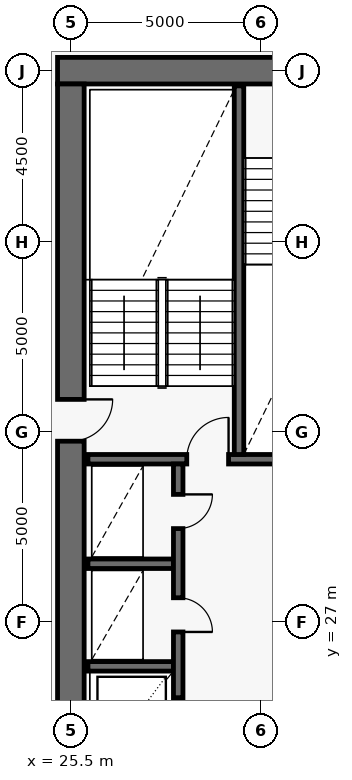
"""IFC4 building model, lengths in metres.
Left out: names, types, materials, properties, quantities, classifications, styles, units other than length and angle.
Written with IfcOpenShell. Run it as: python <this file> out.ifc"""

import sys

from ifc_helpers import new_model, si_unit, direction, frame, frame_2d, origin, place, context, subcontext, project, spatial, rectangle, extrude, element, fill, save


model = new_model("IFC4")
c1 = context("Model", 3, precision=1e-05, world=origin(), true_north=direction((0.0, 1.0)))
c2 = subcontext(c1, "Body", "Model", "MODEL_VIEW")
j1 = project(units=[si_unit("LENGTHUNIT", "METRE"), si_unit("PLANEANGLEUNIT", "RADIAN")], contexts=[c1])
p1 = place(None, origin())
s1 = spatial("IfcSite", under=j1, at=p1, CompositionType="ELEMENT")
p2 = place(p1, origin())
s2 = spatial("IfcBuilding", under=s1, at=p2, CompositionType="ELEMENT")
p3 = place(p2, frame((0.0, 0.0, 150.4)))
s3 = spatial("IfcBuildingStorey", under=s2, at=p3, CompositionType="ELEMENT", Elevation=150.4)
p4 = place(p3, frame((36.75, 41.5, 0.0), z_axis=(0.0, 0.0, 1.0), x_axis=(-1.0, 0.0, 0.0)))
e1 = element("IfcWall", 1, at=p4, inside=s3, PredefinedType="SHEAR", context=c2, shape_type="SweptSolid", body=[
    extrude(rectangle(XDim=11.6, YDim=0.7, at=frame_2d((5.8, 0.0))), origin(), (0.0, 0.0, 1.0), 3.8),
])
p5 = place(p4, frame((4.25, 0.0, 0.0)))
e2 = element("IfcOpeningElement", 2, at=p5, cuts=e1, PredefinedType="OPENING", context=c2, shape_type="SweptSolid", body=[
    extrude(rectangle(XDim=1.1, YDim=2.15, at=frame_2d((0.55, 1.075))), frame((0.0, 0.362, 0.0), z_axis=(0.0, -1.0, 0.0), x_axis=(1.0, 0.0, 0.0)), (0.0, 0.0, 1.0), 0.724),
])
p6 = place(p3, frame((25.5, 22.85, 0.0), z_axis=(0.0, 0.0, 1.0), x_axis=(0.0, 1.0, 0.0)))
e3 = element("IfcWall", 3, at=p6, inside=s3, PredefinedType="SHEAR", context=c2, shape_type="SweptSolid", body=[
    extrude(rectangle(XDim=18.3, YDim=0.7, at=frame_2d((9.15, 0.0))), origin(), (0.0, 0.0, 1.0), 3.8),
])
p7 = place(p6, frame((8.9, 0.0, 0.0)))
e4 = element("IfcOpeningElement", 4, at=p7, cuts=e3, PredefinedType="OPENING", context=c2, shape_type="SweptSolid", body=[
    extrude(rectangle(XDim=1.1, YDim=2.15, at=frame_2d((0.55, 1.075))), frame((0.0, 0.362, 0.0), z_axis=(0.0, -1.0, 0.0), x_axis=(1.0, 0.0, 0.0)), (0.0, 0.0, 1.0), 0.724),
])
p8 = place(p3, frame((25.95, 31.275, 0.0), z_axis=(0.0, 0.0, 1.0), x_axis=(1.0, 0.0, 0.0)))
e5 = element("IfcWall", 5, at=p8, inside=s3, PredefinedType="SOLIDWALL", context=c2, shape_type="SweptSolid", body=[
    extrude(rectangle(XDim=20.1, YDim=0.25, at=frame_2d((10.05, 0.0))), origin(), (0.0, 0.0, 1.0), 3.8),
])
p9 = place(p8, frame((2.6, 0.0, 0.0)))
e6 = element("IfcOpeningElement", 6, at=p9, cuts=e5, PredefinedType="OPENING", context=c2, shape_type="SweptSolid", body=[
    extrude(rectangle(XDim=1.1, YDim=2.15, at=frame_2d((0.55, 1.075))), frame((0.0, 0.137, 0.0), z_axis=(0.0, -1.0, 0.0), x_axis=(1.0, 0.0, 0.0)), (0.0, 0.0, 1.0), 0.274),
])
p10 = place(p8, frame((10.6, 0.0, 0.0)))
e7 = element("IfcOpeningElement", 7, at=p10, cuts=e5, PredefinedType="OPENING", context=c2, shape_type="SweptSolid", body=[
    extrude(rectangle(XDim=1.1, YDim=2.15, at=frame_2d((0.55, 1.075))), frame((0.0, 0.137, 0.0), z_axis=(0.0, -1.0, 0.0), x_axis=(1.0, 0.0, 0.0)), (0.0, 0.0, 1.0), 0.274),
])
p11 = place(p8, frame((16.35, 0.0, 0.0)))
e8 = element("IfcOpeningElement", 8, at=p11, cuts=e5, PredefinedType="OPENING", context=c2, shape_type="SweptSolid", body=[
    extrude(rectangle(XDim=1.1, YDim=2.15, at=frame_2d((0.55, 1.075))), frame((0.0, 0.137, 0.0), z_axis=(0.0, -1.0, 0.0), x_axis=(1.0, 0.0, 0.0)), (0.0, 0.0, 1.0), 0.274),
])
p12 = place(p3, frame((29.925, 31.4, 0.0), z_axis=(0.0, 0.0, 1.0), x_axis=(0.0, 1.0, 0.0)))
e9 = element("IfcWall", 9, at=p12, inside=s3, PredefinedType="SOLIDWALL", context=c2, shape_type="SweptSolid", body=[
    extrude(rectangle(XDim=9.7, YDim=0.25, at=frame_2d((4.85, 0.0))), origin(), (0.0, 0.0, 1.0), 3.8),
])
for number, where, z_axis, x_axis in (
    (10, (25.95, 25.825, 0.0), (0.0, 0.0, 1.0), (1.0, 0.0, 0.0)),
    (11, (25.95, 28.525, 0.0), (0.0, 0.0, 1.0), (1.0, 0.0, 0.0)),
):
    element("IfcWall", number, at=place(p3, frame(where, z_axis=z_axis, x_axis=x_axis)), inside=s3, PredefinedType="SOLIDWALL", context=c2, shape_type="SweptSolid", body=[
        extrude(rectangle(XDim=2.25, YDim=0.25, at=frame_2d((1.125, 0.0))), origin(), (0.0, 0.0, 1.0), 3.8),
    ])
p13 = place(p3, frame((28.325, 22.95, 0.0), z_axis=(0.0, 0.0, 1.0), x_axis=(0.0, 1.0, 0.0)))
e12 = element("IfcWall", 12, at=p13, inside=s3, PredefinedType="SOLIDWALL", context=c2, shape_type="SweptSolid", body=[
    extrude(rectangle(XDim=8.2, YDim=0.25, at=frame_2d((4.1, 0.0))), origin(), (0.0, 0.0, 1.0), 3.8),
])
p14 = place(p13, frame((0.75, 0.0, 0.0)))
e13 = element("IfcOpeningElement", 13, at=p14, cuts=e12, PredefinedType="OPENING", context=c2, shape_type="SweptSolid", body=[
    extrude(rectangle(XDim=1.3, YDim=2.3, at=frame_2d((0.65, 1.15))), frame((0.0, 0.137, 0.0), z_axis=(0.0, -1.0, 0.0), x_axis=(1.0, 0.0, 0.0)), (0.0, 0.0, 1.0), 0.274),
])
p15 = place(p13, frame((3.78, 0.0, 0.0)))
e14 = element("IfcOpeningElement", 14, at=p15, cuts=e12, PredefinedType="OPENING", context=c2, shape_type="SweptSolid", body=[
    extrude(rectangle(XDim=0.9, YDim=2.1, at=frame_2d((0.45, 1.05))), frame((0.0, 0.137, 0.0), z_axis=(0.0, -1.0, 0.0), x_axis=(1.0, 0.0, 0.0)), (0.0, 0.0, 1.0), 0.274),
])
p16 = place(p13, frame((6.5, 0.0, 0.0)))
e15 = element("IfcOpeningElement", 15, at=p16, cuts=e12, PredefinedType="OPENING", context=c2, shape_type="SweptSolid", body=[
    extrude(rectangle(XDim=0.9, YDim=2.1, at=frame_2d((0.45, 1.05))), frame((0.0, 0.137, 0.0), z_axis=(0.0, -1.0, 0.0), x_axis=(1.0, 0.0, 0.0)), (0.0, 0.0, 1.0), 0.274),
])
p17 = place(p7, frame((1.1, 0.0, 0.0), z_axis=(0.0, 0.0, 1.0), x_axis=(-1.0, 0.0, 0.0)))
e16 = element("IfcDoor", 16, at=p17, inside=s3, OperationType="SINGLE_SWING_LEFT", PredefinedType="USERDEFINED", context=c2, shape_type="SweptSolid", body=[
    extrude(rectangle(XDim=1.1, YDim=2.15, at=frame_2d((0.55, 1.075))), frame((0.0, 0.025, 0.0), z_axis=(0.0, -1.0, 0.0), x_axis=(1.0, 0.0, 0.0)), (0.0, 0.0, 1.0), 0.05),
])
fill(e4, e16)
p18 = place(p9, origin())
e17 = element("IfcDoor", 17, at=p18, inside=s3, OperationType="SINGLE_SWING_RIGHT", PredefinedType="USERDEFINED", context=c2, shape_type="SweptSolid", body=[
    extrude(rectangle(XDim=1.1, YDim=2.15, at=frame_2d((0.55, 1.075))), frame((0.0, 0.025, 0.0), z_axis=(0.0, -1.0, 0.0), x_axis=(1.0, 0.0, 0.0)), (0.0, 0.0, 1.0), 0.05),
])
fill(e6, e17)
p19 = place(p14, frame((1.3, 0.0, 0.0), z_axis=(0.0, 0.0, 1.0), x_axis=(-1.0, 0.0, 0.0)))
e18 = element("IfcDoor", 18, at=p19, inside=s3, OperationType="DOUBLE_DOOR_SLIDING", PredefinedType="DOOR", context=c2, shape_type="SweptSolid", body=[
    extrude(rectangle(XDim=1.3, YDim=2.3, at=frame_2d((0.65, 1.15))), frame((0.0, 0.025, 0.0), z_axis=(0.0, -1.0, 0.0), x_axis=(1.0, 0.0, 0.0)), (0.0, 0.0, 1.0), 0.05),
])
fill(e13, e18)
p20 = place(p15, frame((0.9, 0.0, 0.0), z_axis=(0.0, 0.0, 1.0), x_axis=(-1.0, 0.0, 0.0)))
e19 = element("IfcDoor", 19, at=p20, inside=s3, OperationType="SINGLE_SWING_RIGHT", PredefinedType="DOOR", context=c2, shape_type="SweptSolid", body=[
    extrude(rectangle(XDim=0.9, YDim=2.1, at=frame_2d((0.45, 1.05))), frame((0.0, 0.025, 0.0), z_axis=(0.0, -1.0, 0.0), x_axis=(1.0, 0.0, 0.0)), (0.0, 0.0, 1.0), 0.05),
])
fill(e14, e19)
p21 = place(p16, frame((0.9, 0.0, 0.0), z_axis=(0.0, 0.0, 1.0), x_axis=(-1.0, 0.0, 0.0)))
e20 = element("IfcDoor", 20, at=p21, inside=s3, OperationType="SINGLE_SWING_LEFT", PredefinedType="DOOR", context=c2, shape_type="SweptSolid", body=[
    extrude(rectangle(XDim=0.9, YDim=2.1, at=frame_2d((0.45, 1.05))), frame((0.0, 0.025, 0.0), z_axis=(0.0, -1.0, 0.0), x_axis=(1.0, 0.0, 0.0)), (0.0, 0.0, 1.0), 0.05),
])
fill(e15, e20)
save(model, sys.argv[1])
